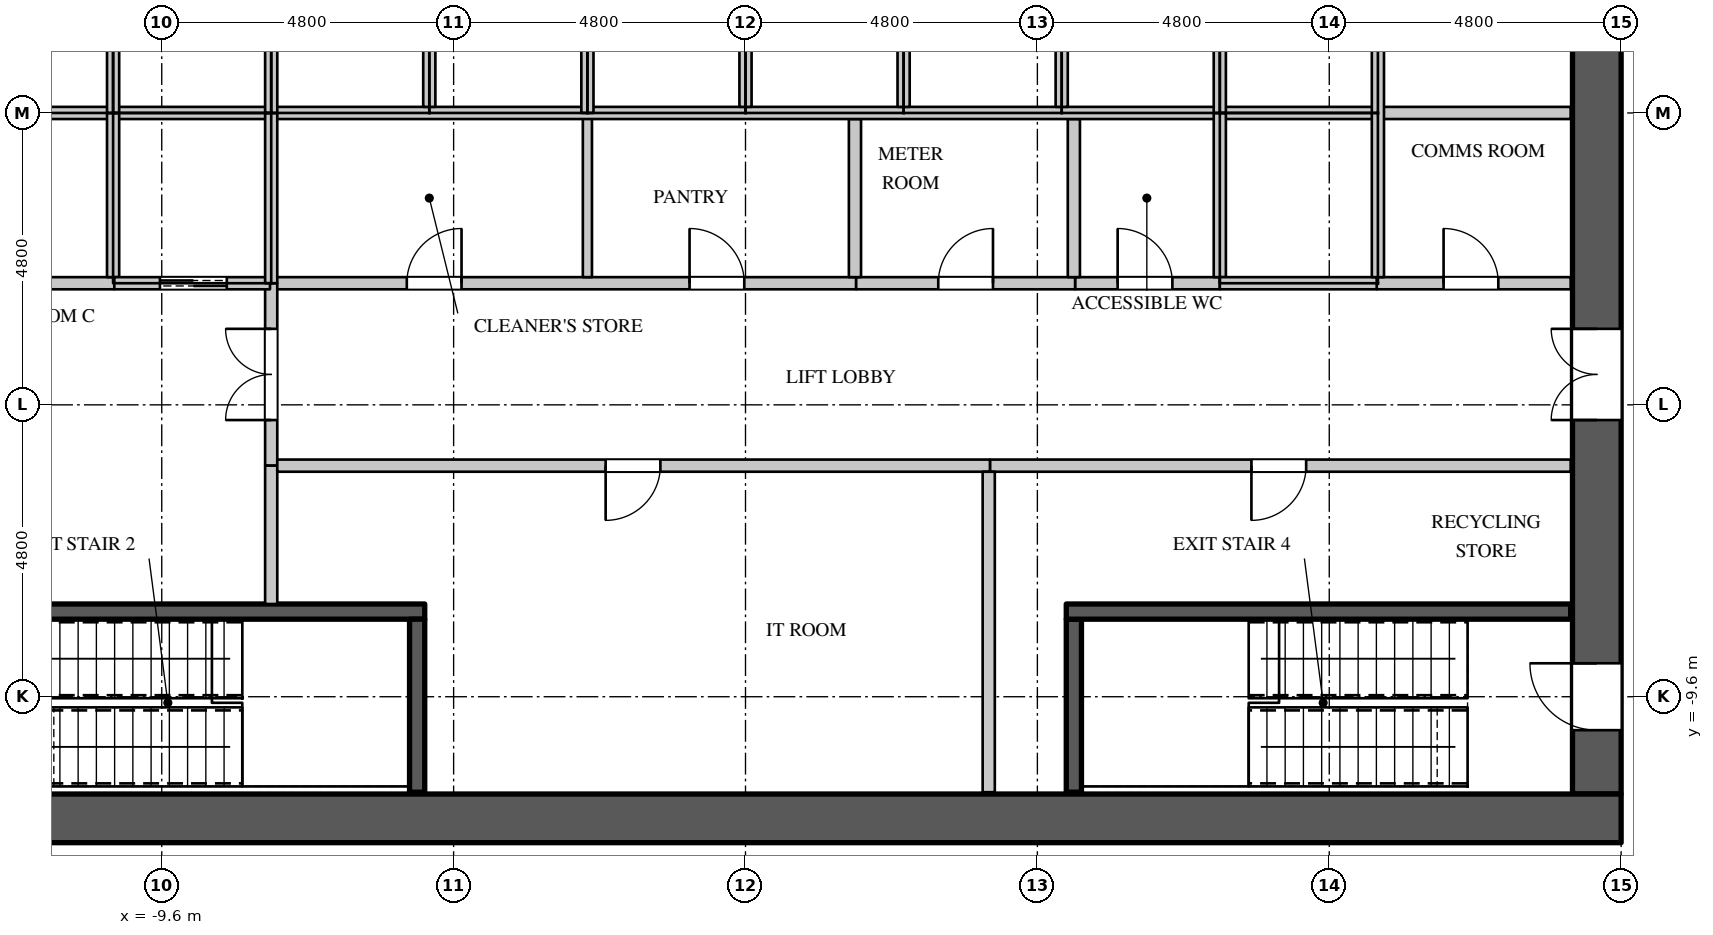
"""IFC4 building model, lengths in metres.
Left out: names, types, materials, properties, quantities, classifications, styles, units other than length and angle.
Written with IfcOpenShell. Run it as: python <this file> out.ifc"""

import sys

from ifc_helpers import new_model, si_unit, direction, frame, frame_2d, origin, place, context, subcontext, project, spatial, rectangle, extrude, element, fill, save


model = new_model("IFC4")
c1 = context("Model", 3, precision=1e-05, world=origin(), true_north=direction((0.0, 1.0)))
c2 = subcontext(c1, "Body", "Model", "MODEL_VIEW")
j1 = project(units=[si_unit("LENGTHUNIT", "METRE"), si_unit("PLANEANGLEUNIT", "RADIAN")], contexts=[c1])
p1 = place(None, origin())
s1 = spatial("IfcSite", under=j1, at=p1, CompositionType="ELEMENT")
p2 = place(p1, origin())
s2 = spatial("IfcBuilding", under=s1, at=p2, CompositionType="ELEMENT")
p3 = place(p2, frame((0.0, 0.0, 148.5)))
s3 = spatial("IfcBuildingStorey", under=s2, at=p3, CompositionType="ELEMENT", Elevation=148.5)
p4 = place(p3, frame((-14.4, -11.6, 0.0), z_axis=(0.0, 0.0, 1.0), x_axis=(1.0, 0.0, 0.0)))
e1 = element("IfcWall", 1, at=p4, inside=s3, PredefinedType="SHEAR", context=c2, shape_type="SweptSolid", body=[
    extrude(rectangle(XDim=28.8, YDim=0.8, at=frame_2d((14.4, 0.0))), origin(), (0.0, 0.0, 1.0), 4.2),
])
p5 = place(p3, frame((14.0, -11.2, 0.0), z_axis=(0.0, 0.0, 1.0), x_axis=(0.0, 1.0, 0.0)))
e2 = element("IfcWall", 2, at=p5, inside=s3, PredefinedType="SHEAR", context=c2, shape_type="SweptSolid", body=[
    extrude(rectangle(XDim=22.4, YDim=0.8, at=frame_2d((11.2, 0.0))), origin(), (0.0, 0.0, 1.0), 4.2),
])
p6 = place(p5, frame((20.25, 0.0, 0.0)))
e3 = element("IfcOpeningElement", 3, at=p6, cuts=e2, PredefinedType="OPENING", context=c2, shape_type="SweptSolid", body=[
    extrude(rectangle(XDim=1.1, YDim=2.2, at=frame_2d((0.55, 1.1))), frame((0.0, 0.41, 0.0), z_axis=(0.0, -1.0, 0.0), x_axis=(1.0, 0.0, 0.0)), (0.0, 0.0, 1.0), 0.82),
])
p7 = place(p5, frame((1.05, 0.0, 0.0)))
e4 = element("IfcOpeningElement", 4, at=p7, cuts=e2, PredefinedType="OPENING", context=c2, shape_type="SweptSolid", body=[
    extrude(rectangle(XDim=1.1, YDim=2.2, at=frame_2d((0.55, 1.1))), frame((0.0, 0.41, 0.0), z_axis=(0.0, -1.0, 0.0), x_axis=(1.0, 0.0, 0.0)), (0.0, 0.0, 1.0), 0.82),
])
p8 = place(p5, frame((14.75, 0.0, 0.0)))
e5 = element("IfcOpeningElement", 5, at=p8, cuts=e2, PredefinedType="OPENING", context=c2, shape_type="SweptSolid", body=[
    extrude(rectangle(XDim=1.5, YDim=2.4, at=frame_2d((0.75, 1.2))), frame((0.0, 0.41, 0.0), z_axis=(0.0, -1.0, 0.0), x_axis=(1.0, 0.0, 0.0)), (0.0, 0.0, 1.0), 0.82),
])
p9 = place(p5, frame((6.15, 0.0, 0.0)))
e6 = element("IfcOpeningElement", 6, at=p9, cuts=e2, PredefinedType="OPENING", context=c2, shape_type="SweptSolid", body=[
    extrude(rectangle(XDim=1.5, YDim=2.4, at=frame_2d((0.75, 1.2))), frame((0.0, 0.41, 0.0), z_axis=(0.0, -1.0, 0.0), x_axis=(1.0, 0.0, 0.0)), (0.0, 0.0, 1.0), 0.82),
])
p10 = place(p3, frame((-7.82, -2.8, 0.0), z_axis=(0.0, 0.0, 1.0), x_axis=(1.0, 0.0, 0.0)))
e7 = element("IfcWall", 7, at=p10, inside=s3, PredefinedType="PARTITIONING", context=c2, shape_type="SweptSolid", body=[
    extrude(rectangle(XDim=9.64, YDim=0.2, at=frame_2d((4.82, 0.0))), origin(), (0.0, 0.0, 1.0), 3.798),
])
p11 = place(p10, frame((2.25, 0.0, 0.0)))
e8 = element("IfcOpeningElement", 8, at=p11, cuts=e7, PredefinedType="OPENING", context=c2, shape_type="SweptSolid", body=[
    extrude(rectangle(XDim=0.9, YDim=2.2, at=frame_2d((0.45, 1.1))), frame((0.0, 0.11, 0.0), z_axis=(0.0, -1.0, 0.0), x_axis=(1.0, 0.0, 0.0)), (0.0, 0.0, 1.0), 0.22),
])
p12 = place(p10, frame((6.9, 0.0, 0.0)))
e9 = element("IfcOpeningElement", 9, at=p12, cuts=e7, PredefinedType="OPENING", context=c2, shape_type="SweptSolid", body=[
    extrude(rectangle(XDim=0.9, YDim=2.2, at=frame_2d((0.45, 1.1))), frame((0.0, 0.11, 0.0), z_axis=(0.0, -1.0, 0.0), x_axis=(1.0, 0.0, 0.0)), (0.0, 0.0, 1.0), 0.22),
])
p13 = place(p3, frame((-7.8, -5.8, 0.0), z_axis=(0.0, 0.0, 1.0), x_axis=(0.0, 1.0, 0.0)))
e10 = element("IfcWall", 10, at=p13, inside=s3, PredefinedType="PARTITIONING", context=c2, shape_type="SweptSolid", body=[
    extrude(rectangle(XDim=3.0, YDim=0.2, at=frame_2d((1.5, 0.0))), origin(), (0.0, 0.0, 1.0), 3.798),
])
p14 = place(p13, frame((0.75, 0.0, 0.0)))
e11 = element("IfcOpeningElement", 11, at=p14, cuts=e10, PredefinedType="OPENING", context=c2, shape_type="SweptSolid", body=[
    extrude(rectangle(XDim=1.5, YDim=2.4, at=frame_2d((0.75, 1.2))), frame((0.0, 0.11, 0.0), z_axis=(0.0, -1.0, 0.0), x_axis=(1.0, 0.0, 0.0)), (0.0, 0.0, 1.0), 0.22),
])
p15 = place(p3, frame((4.02, -5.8, 0.0), z_axis=(0.0, 0.0, 1.0), x_axis=(1.0, 0.0, 0.0)))
e12 = element("IfcWall", 12, at=p15, inside=s3, PredefinedType="PARTITIONING", context=c2, shape_type="SweptSolid", body=[
    extrude(rectangle(XDim=9.55, YDim=0.2, at=frame_2d((4.775, 0.0))), origin(), (0.0, 0.0, 1.0), 3.798),
])
p16 = place(p15, frame((4.3, 0.0, 0.0)))
e13 = element("IfcOpeningElement", 13, at=p16, cuts=e12, PredefinedType="OPENING", context=c2, shape_type="SweptSolid", body=[
    extrude(rectangle(XDim=0.9, YDim=2.2, at=frame_2d((0.45, 1.1))), frame((0.0, 0.11, 0.0), z_axis=(0.0, -1.0, 0.0), x_axis=(1.0, 0.0, 0.0)), (0.0, 0.0, 1.0), 0.22),
])
p17 = place(p3, frame((5.42, -2.8, 0.0), z_axis=(0.0, 0.0, 1.0), x_axis=(1.0, 0.0, 0.0)))
e14 = element("IfcWall", 14, at=p17, inside=s3, PredefinedType="PARTITIONING", context=c2, shape_type="SweptSolid", body=[
    extrude(rectangle(XDim=2.38, YDim=0.2, at=frame_2d((1.19, 0.0))), origin(), (0.0, 0.0, 1.0), 3.798),
])
p18 = place(p17, frame((0.7, 0.0, 0.0)))
e15 = element("IfcOpeningElement", 15, at=p18, cuts=e14, PredefinedType="OPENING", context=c2, shape_type="SweptSolid", body=[
    extrude(rectangle(XDim=0.9, YDim=2.2, at=frame_2d((0.45, 1.1))), frame((0.0, 0.11, 0.0), z_axis=(0.0, -1.0, 0.0), x_axis=(1.0, 0.0, 0.0)), (0.0, 0.0, 1.0), 0.22),
])
p19 = place(p3, frame((-2.6, -2.7, 0.0), z_axis=(0.0, 0.0, 1.0), x_axis=(0.0, 1.0, 0.0)))
e16 = element("IfcWall", 16, at=p19, inside=s3, PredefinedType="PARTITIONING", context=c2, shape_type="SweptSolid", body=[
    extrude(rectangle(XDim=2.7, YDim=0.15, at=frame_2d((1.35, 0.0))), origin(), (0.0, 0.0, 1.0), 3.798),
])
p20 = place(p3, frame((-13.57, -2.8, 0.0), z_axis=(0.0, 0.0, 1.0), x_axis=(1.0, 0.0, 0.0)))
e17 = element("IfcWall", 17, at=p20, inside=s3, PredefinedType="PARTITIONING", context=c2, shape_type="SweptSolid", body=[
    extrude(rectangle(XDim=3.19, YDim=0.2, at=frame_2d((1.595, 0.0))), origin(), (0.0, 0.0, 1.0), 3.798),
])
p21 = place(p20, frame((1.25, 0.0, 0.0)))
e18 = element("IfcOpeningElement", 18, at=p21, cuts=e17, PredefinedType="OPENING", context=c2, shape_type="SweptSolid", body=[
    extrude(rectangle(XDim=0.6, YDim=2.0, at=frame_2d((0.3, 1.0))), frame((0.0, 0.11, 0.0), z_axis=(0.0, -1.0, 0.0), x_axis=(1.0, 0.0, 0.0)), (0.0, 0.0, 1.0), 0.22),
])
p22 = place(p3, frame((-7.8, -8.075, 0.0), z_axis=(0.0, 0.0, 1.0), x_axis=(0.0, 1.0, 0.0)))
e19 = element("IfcWall", 19, at=p22, inside=s3, PredefinedType="PARTITIONING", context=c2, shape_type="SweptSolid", body=[
    extrude(rectangle(XDim=2.275, YDim=0.2, at=frame_2d((1.137, 0.0))), origin(), (0.0, 0.0, 1.0), 3.798),
])
p23 = place(p3, frame((-7.7, -5.8, 0.0), z_axis=(0.0, 0.0, 1.0), x_axis=(1.0, 0.0, 0.0)))
e20 = element("IfcWall", 20, at=p23, inside=s3, PredefinedType="PARTITIONING", context=c2, shape_type="SweptSolid", body=[
    extrude(rectangle(XDim=11.72, YDim=0.2, at=frame_2d((5.86, 0.0))), origin(), (0.0, 0.0, 1.0), 3.798),
])
p24 = place(p23, frame((5.4, 0.0, 0.0)))
e21 = element("IfcOpeningElement", 21, at=p24, cuts=e20, PredefinedType="OPENING", context=c2, shape_type="SweptSolid", body=[
    extrude(rectangle(XDim=0.9, YDim=2.2, at=frame_2d((0.45, 1.1))), frame((0.0, 0.11, 0.0), z_axis=(0.0, -1.0, 0.0), x_axis=(1.0, 0.0, 0.0)), (0.0, 0.0, 1.0), 0.22),
])
p25 = place(p3, frame((1.82, -2.8, 0.0), z_axis=(0.0, 0.0, 1.0), x_axis=(1.0, 0.0, 0.0)))
e22 = element("IfcWall", 22, at=p25, inside=s3, PredefinedType="PARTITIONING", context=c2, shape_type="SweptSolid", body=[
    extrude(rectangle(XDim=3.6, YDim=0.2, at=frame_2d((1.8, 0.0))), origin(), (0.0, 0.0, 1.0), 3.798),
])
p26 = place(p25, frame((1.35, 0.0, 0.0)))
e23 = element("IfcOpeningElement", 23, at=p26, cuts=e22, PredefinedType="OPENING", context=c2, shape_type="SweptSolid", body=[
    extrude(rectangle(XDim=0.9, YDim=2.2, at=frame_2d((0.45, 1.1))), frame((0.0, 0.11, 0.0), z_axis=(0.0, -1.0, 0.0), x_axis=(1.0, 0.0, 0.0)), (0.0, 0.0, 1.0), 0.22),
])
p27 = place(p3, frame((1.8, -2.7, 0.0), z_axis=(0.0, 0.0, 1.0), x_axis=(0.0, 1.0, 0.0)))
e24 = element("IfcWall", 24, at=p27, inside=s3, PredefinedType="PARTITIONING", context=c2, shape_type="SweptSolid", body=[
    extrude(rectangle(XDim=2.6, YDim=0.2, at=frame_2d((1.3, 0.0))), origin(), (0.0, 0.0, 1.0), 3.798),
])
p28 = place(p3, frame((4.0, -11.17, 0.0), z_axis=(0.0, 0.0, 1.0), x_axis=(0.0, 1.0, 0.0)))
e25 = element("IfcWall", 25, at=p28, inside=s3, PredefinedType="PARTITIONING", context=c2, shape_type="SweptSolid", body=[
    extrude(rectangle(XDim=5.27, YDim=0.2, at=frame_2d((2.635, 0.0))), origin(), (0.0, 0.0, 1.0), 3.798),
])
p29 = place(p3, frame((5.4, -2.7, 0.0), z_axis=(0.0, 0.0, 1.0), x_axis=(0.0, 1.0, 0.0)))
e26 = element("IfcWall", 26, at=p29, inside=s3, PredefinedType="PARTITIONING", context=c2, shape_type="SweptSolid", body=[
    extrude(rectangle(XDim=2.6, YDim=0.2, at=frame_2d((1.3, 0.0))), origin(), (0.0, 0.0, 1.0), 3.798),
])
p30 = place(p3, frame((10.38, -2.8, 0.0), z_axis=(0.0, 0.0, 1.0), x_axis=(1.0, 0.0, 0.0)))
e27 = element("IfcWall", 27, at=p30, inside=s3, PredefinedType="PARTITIONING", context=c2, shape_type="SweptSolid", body=[
    extrude(rectangle(XDim=3.19, YDim=0.2, at=frame_2d((1.595, 0.0))), origin(), (0.0, 0.0, 1.0), 3.798),
])
p31 = place(p30, frame((1.1, 0.0, 0.0)))
e28 = element("IfcOpeningElement", 28, at=p31, cuts=e27, PredefinedType="OPENING", context=c2, shape_type="SweptSolid", body=[
    extrude(rectangle(XDim=0.9, YDim=2.2, at=frame_2d((0.45, 1.1))), frame((0.0, 0.11, 0.0), z_axis=(0.0, -1.0, 0.0), x_axis=(1.0, 0.0, 0.0)), (0.0, 0.0, 1.0), 0.22),
])
p32 = place(p3, frame((10.4, 0.0, 0.0), z_axis=(0.0, 0.0, 1.0), x_axis=(1.0, 0.0, 0.0)))
e29 = element("IfcWall", 29, at=p32, inside=s3, PredefinedType="PARTITIONING", context=c2, shape_type="SweptSolid", body=[
    extrude(rectangle(XDim=3.17, YDim=0.2, at=frame_2d((1.585, 0.0))), origin(), (0.0, 0.0, 1.0), 3.798),
])
p33 = place(p3, frame((-13.57, 0.0, 0.0), z_axis=(0.0, 0.0, 1.0), x_axis=(1.0, 0.0, 0.0)))
e30 = element("IfcWall", 30, at=p33, inside=s3, PredefinedType="PARTITIONING", context=c2, shape_type="SweptSolid", body=[
    extrude(rectangle(XDim=23.97, YDim=0.2, at=frame_2d((11.985, 0.0))), origin(), (0.0, 0.0, 1.0), 3.798),
])
p34 = place(p3, frame((-10.4, -2.7, 0.0), z_axis=(0.0, 0.0, 1.0), x_axis=(0.0, 1.0, 0.0)))
e31 = element("IfcWall", 31, at=p34, inside=s3, PredefinedType="PARTITIONING", context=c2, shape_type="SweptSolid", body=[
    extrude(rectangle(XDim=2.7, YDim=0.2, at=frame_2d((1.35, 0.0))), origin(), (0.0, 0.0, 1.0), 3.798),
])
p35 = place(p3, frame((-10.38, -2.8, 0.0), z_axis=(0.0, 0.0, 1.0), x_axis=(1.0, 0.0, 0.0)))
e32 = element("IfcWall", 32, at=p35, inside=s3, PredefinedType="PARTITIONING", context=c2, shape_type="SweptSolid", body=[
    extrude(rectangle(XDim=2.56, YDim=0.2, at=frame_2d((1.28, 0.0))), origin(), (0.0, 0.0, 1.0), 3.798),
])
p36 = place(p35, frame((0.75, 0.0, 0.0)))
e33 = element("IfcOpeningElement", 33, at=p36, cuts=e32, PredefinedType="OPENING", context=c2, shape_type="SweptSolid", body=[
    extrude(rectangle(XDim=1.1, YDim=2.2, at=frame_2d((0.55, 1.1))), frame((0.0, 0.11, 0.0), z_axis=(0.0, -1.0, 0.0), x_axis=(1.0, 0.0, 0.0)), (0.0, 0.0, 1.0), 0.22),
])
p37 = place(p3, frame((-10.4, 0.0, 0.0), z_axis=(0.0, 0.0, 1.0), x_axis=(0.0, 1.0, 0.0)))
e34 = element("IfcWall", 34, at=p37, inside=s3, PredefinedType="PARTITIONING", context=c2, shape_type="SweptSolid", body=[
    extrude(rectangle(XDim=2.7, YDim=0.2, at=frame_2d((1.35, 0.0))), origin(), (0.0, 0.0, 1.0), 3.798),
])
for number, where, z_axis, x_axis in (
    (35, (-7.8, -2.8, 0.0), (0.0, 0.0, 1.0), (0.0, 1.0, 0.0)),
    (36, (-7.8, 0.0, 0.0), (0.0, 0.0, 1.0), (0.0, 1.0, 0.0)),
):
    element("IfcWall", number, at=place(p3, frame(where, z_axis=z_axis, x_axis=x_axis)), inside=s3, PredefinedType="PARTITIONING", context=c2, shape_type="SweptSolid", body=[
        extrude(rectangle(XDim=2.8, YDim=0.2, at=frame_2d((1.4, 0.0))), origin(), (0.0, 0.0, 1.0), 3.798),
    ])
p38 = place(p3, frame((-5.2, 0.1, 0.0), z_axis=(0.0, 0.0, 1.0), x_axis=(0.0, 1.0, 0.0)))
e37 = element("IfcWall", 37, at=p38, inside=s3, PredefinedType="PARTITIONING", context=c2, shape_type="SweptSolid", body=[
    extrude(rectangle(XDim=2.6, YDim=0.2, at=frame_2d((1.3, 0.0))), origin(), (0.0, 0.0, 1.0), 3.798),
])
p39 = place(p3, frame((-2.6, 0.0, 0.0), z_axis=(0.0, 0.0, 1.0), x_axis=(0.0, 1.0, 0.0)))
e38 = element("IfcWall", 38, at=p39, inside=s3, PredefinedType="PARTITIONING", context=c2, shape_type="SweptSolid", body=[
    extrude(rectangle(XDim=2.7, YDim=0.2, at=frame_2d((1.35, 0.0))), origin(), (0.0, 0.0, 1.0), 3.798),
])
for number, where, z_axis, x_axis in (
    (39, (0.0, 0.1, 0.0), (0.0, 0.0, 1.0), (0.0, 1.0, 0.0)),
    (40, (2.6, 0.1, 0.0), (0.0, 0.0, 1.0), (0.0, 1.0, 0.0)),
    (41, (5.2, 0.1, 0.0), (0.0, 0.0, 1.0), (0.0, 1.0, 0.0)),
):
    element("IfcWall", number, at=place(p3, frame(where, z_axis=z_axis, x_axis=x_axis)), inside=s3, PredefinedType="PARTITIONING", context=c2, shape_type="SweptSolid", body=[
        extrude(rectangle(XDim=2.6, YDim=0.2, at=frame_2d((1.3, 0.0))), origin(), (0.0, 0.0, 1.0), 3.798),
    ])
p40 = place(p3, frame((7.8, -2.7, 0.0), z_axis=(0.0, 0.0, 1.0), x_axis=(0.0, 1.0, 0.0)))
e42 = element("IfcWall", 42, at=p40, inside=s3, PredefinedType="PARTITIONING", context=c2, shape_type="SweptSolid", body=[
    extrude(rectangle(XDim=2.7, YDim=0.2, at=frame_2d((1.35, 0.0))), origin(), (0.0, 0.0, 1.0), 3.798),
])
p41 = place(p3, frame((7.8, -2.8, 0.0), z_axis=(0.0, 0.0, 1.0), x_axis=(1.0, 0.0, 0.0)))
e43 = element("IfcWall", 43, at=p41, inside=s3, PredefinedType="PARTITIONING", context=c2, shape_type="SweptSolid", body=[
    extrude(rectangle(XDim=2.58, YDim=0.2, at=frame_2d((1.29, 0.0))), origin(), (0.0, 0.0, 1.0), 3.798),
])
p42 = place(p3, frame((7.8, 0.0, 0.0), z_axis=(0.0, 0.0, 1.0), x_axis=(0.0, 1.0, 0.0)))
e44 = element("IfcWall", 44, at=p42, inside=s3, PredefinedType="PARTITIONING", context=c2, shape_type="SweptSolid", body=[
    extrude(rectangle(XDim=2.7, YDim=0.2, at=frame_2d((1.35, 0.0))), origin(), (0.0, 0.0, 1.0), 3.798),
])
p43 = place(p3, frame((10.4, -2.7, 0.0), z_axis=(0.0, 0.0, 1.0), x_axis=(0.0, 1.0, 0.0)))
e45 = element("IfcWall", 45, at=p43, inside=s3, PredefinedType="PARTITIONING", context=c2, shape_type="SweptSolid", body=[
    extrude(rectangle(XDim=5.4, YDim=0.2, at=frame_2d((2.7, 0.0))), origin(), (0.0, 0.0, 1.0), 3.798),
])
p44 = place(p3, frame((-13.57, -8.2, 0.0), z_axis=(0.0, 0.0, 1.0), x_axis=(1.0, 0.0, 0.0)))
e46 = element("IfcWall", 46, at=p44, inside=s3, PredefinedType="SHEAR", context=c2, shape_type="SweptSolid", body=[
    extrude(rectangle(XDim=8.295, YDim=0.25, at=frame_2d((4.147, 0.0))), origin(), (0.0, 0.0, 1.0), 3.798),
])
p45 = place(p44, frame((0.15, 0.0, 0.0)))
e47 = element("IfcOpeningElement", 47, at=p45, cuts=e46, PredefinedType="OPENING", context=c2, shape_type="SweptSolid", body=[
    extrude(rectangle(XDim=1.1, YDim=2.2, at=frame_2d((0.55, 1.1))), frame((0.0, 0.135, 0.0), z_axis=(0.0, -1.0, 0.0), x_axis=(1.0, 0.0, 0.0)), (0.0, 0.0, 1.0), 0.27),
])
for number, where, z_axis, x_axis in (
    (48, (-5.4, -11.17, 0.0), (0.0, 0.0, 1.0), (0.0, 1.0, 0.0)),
    (49, (5.4, -11.17, 0.0), (0.0, 0.0, 1.0), (0.0, 1.0, 0.0)),
):
    element("IfcWall", number, at=place(p3, frame(where, z_axis=z_axis, x_axis=x_axis)), inside=s3, PredefinedType="SHEAR", context=c2, shape_type="SweptSolid", body=[
        extrude(rectangle(XDim=2.845, YDim=0.25, at=frame_2d((1.422, 0.0))), origin(), (0.0, 0.0, 1.0), 3.798),
    ])
p46 = place(p3, frame((5.275, -8.2, 0.0), z_axis=(0.0, 0.0, 1.0), x_axis=(1.0, 0.0, 0.0)))
e50 = element("IfcWall", 50, at=p46, inside=s3, PredefinedType="SHEAR", context=c2, shape_type="SweptSolid", body=[
    extrude(rectangle(XDim=8.295, YDim=0.25, at=frame_2d((4.147, 0.0))), origin(), (0.0, 0.0, 1.0), 3.798),
])
p47 = place(p31, origin())
e51 = element("IfcDoor", 51, at=p47, inside=s3, OperationType="SINGLE_SWING_LEFT", PredefinedType="DOOR", context=c2, shape_type="SweptSolid", body=[
    extrude(rectangle(XDim=0.9, YDim=2.2, at=frame_2d((0.45, 1.1))), frame((0.0, 0.025, 0.0), z_axis=(0.0, -1.0, 0.0), x_axis=(1.0, 0.0, 0.0)), (0.0, 0.0, 1.0), 0.05),
])
fill(e28, e51)
p48 = place(p24, origin())
e52 = element("IfcDoor", 52, at=p48, inside=s3, OperationType="SINGLE_SWING_RIGHT", PredefinedType="DOOR", context=c2, shape_type="SweptSolid", body=[
    extrude(rectangle(XDim=0.9, YDim=2.2, at=frame_2d((0.45, 1.1))), frame((0.0, 0.025, 0.0), z_axis=(0.0, -1.0, 0.0), x_axis=(1.0, 0.0, 0.0)), (0.0, 0.0, 1.0), 0.05),
])
fill(e21, e52)
p49 = place(p16, origin())
e53 = element("IfcDoor", 53, at=p49, inside=s3, OperationType="SINGLE_SWING_RIGHT", PredefinedType="DOOR", context=c2, shape_type="SweptSolid", body=[
    extrude(rectangle(XDim=0.9, YDim=2.2, at=frame_2d((0.45, 1.1))), frame((0.0, 0.025, 0.0), z_axis=(0.0, -1.0, 0.0), x_axis=(1.0, 0.0, 0.0)), (0.0, 0.0, 1.0), 0.05),
])
fill(e13, e53)
p50 = place(p11, origin())
e54 = element("IfcDoor", 54, at=p50, inside=s3, OperationType="SINGLE_SWING_RIGHT", PredefinedType="DOOR", context=c2, shape_type="SweptSolid", body=[
    extrude(rectangle(XDim=0.9, YDim=2.2, at=frame_2d((0.45, 1.1))), frame((0.0, 0.025, 0.0), z_axis=(0.0, -1.0, 0.0), x_axis=(1.0, 0.0, 0.0)), (0.0, 0.0, 1.0), 0.05),
])
fill(e8, e54)
p51 = place(p12, origin())
e55 = element("IfcDoor", 55, at=p51, inside=s3, OperationType="SINGLE_SWING_LEFT", PredefinedType="DOOR", context=c2, shape_type="SweptSolid", body=[
    extrude(rectangle(XDim=0.9, YDim=2.2, at=frame_2d((0.45, 1.1))), frame((0.0, 0.025, 0.0), z_axis=(0.0, -1.0, 0.0), x_axis=(1.0, 0.0, 0.0)), (0.0, 0.0, 1.0), 0.05),
])
fill(e9, e55)
p52 = place(p26, origin())
e56 = element("IfcDoor", 56, at=p52, inside=s3, OperationType="SINGLE_SWING_RIGHT", PredefinedType="DOOR", context=c2, shape_type="SweptSolid", body=[
    extrude(rectangle(XDim=0.9, YDim=2.2, at=frame_2d((0.45, 1.1))), frame((0.0, 0.025, 0.0), z_axis=(0.0, -1.0, 0.0), x_axis=(1.0, 0.0, 0.0)), (0.0, 0.0, 1.0), 0.05),
])
fill(e23, e56)
p53 = place(p18, origin())
e57 = element("IfcDoor", 57, at=p53, inside=s3, OperationType="SINGLE_SWING_LEFT", PredefinedType="DOOR", context=c2, shape_type="SweptSolid", body=[
    extrude(rectangle(XDim=0.9, YDim=2.2, at=frame_2d((0.45, 1.1))), frame((0.0, 0.025, 0.0), z_axis=(0.0, -1.0, 0.0), x_axis=(1.0, 0.0, 0.0)), (0.0, 0.0, 1.0), 0.05),
])
fill(e15, e57)
p54 = place(p36, origin())
e58 = element("IfcDoor", 58, at=p54, inside=s3, OperationType="DOUBLE_DOOR_SLIDING", PredefinedType="DOOR", context=c2, shape_type="SweptSolid", body=[
    extrude(rectangle(XDim=1.1, YDim=2.2, at=frame_2d((0.55, 1.1))), frame((0.0, 0.025, 0.0), z_axis=(0.0, -1.0, 0.0), x_axis=(1.0, 0.0, 0.0)), (0.0, 0.0, 1.0), 0.05),
])
fill(e33, e58)
p55 = place(p14, origin())
e59 = element("IfcDoor", 59, at=p55, inside=s3, OperationType="DOUBLE_DOOR_SINGLE_SWING", PredefinedType="DOOR", context=c2, shape_type="SweptSolid", body=[
    extrude(rectangle(XDim=1.5, YDim=2.4, at=frame_2d((0.75, 1.2))), frame((0.0, 0.025, 0.0), z_axis=(0.0, -1.0, 0.0), x_axis=(1.0, 0.0, 0.0)), (0.0, 0.0, 1.0), 0.05),
])
fill(e11, e59)
p56 = place(p7, origin())
e60 = element("IfcDoor", 60, at=p56, inside=s3, OperationType="SINGLE_SWING_RIGHT", PredefinedType="DOOR", context=c2, shape_type="SweptSolid", body=[
    extrude(rectangle(XDim=1.1, YDim=2.2, at=frame_2d((0.55, 1.1))), frame((0.0, 0.395, 0.0), z_axis=(0.0, -1.0, 0.0), x_axis=(1.0, 0.0, 0.0)), (0.0, 0.0, 1.0), 0.05),
])
fill(e4, e60)
p57 = place(p9, origin())
e61 = element("IfcDoor", 61, at=p57, inside=s3, OperationType="DOUBLE_DOOR_SINGLE_SWING", PredefinedType="DOOR", context=c2, shape_type="SweptSolid", body=[
    extrude(rectangle(XDim=1.5, YDim=2.4, at=frame_2d((0.75, 1.2))), frame((0.0, 0.395, 0.0), z_axis=(0.0, -1.0, 0.0), x_axis=(1.0, 0.0, 0.0)), (0.0, 0.0, 1.0), 0.05),
])
fill(e6, e61)
save(model, sys.argv[1])
